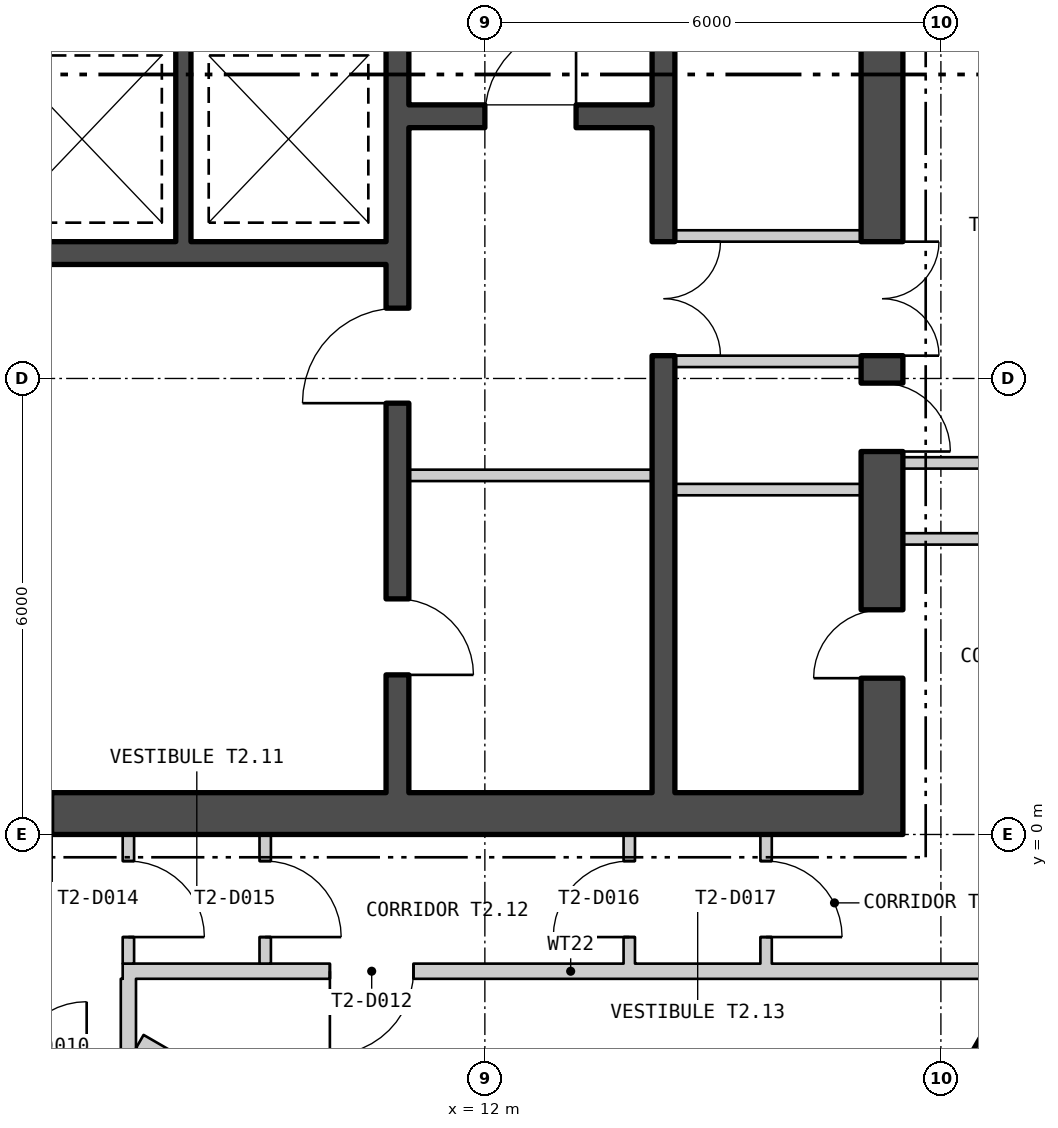
"""IFC4 building model, lengths in metres.
Left out: names, types, materials, properties, quantities, classifications, styles, units other than length and angle.
Written with IfcOpenShell. Run it as: python <this file> out.ifc"""

import sys

from ifc_helpers import new_model, si_unit, direction, frame, frame_2d, origin, place, context, subcontext, project, spatial, polyline, rectangle, outline, extrude, element, fill, save


model = new_model("IFC4")
c1 = context("Model", 3, precision=1e-05, world=origin(), true_north=direction((0.0, 1.0)))
c2 = subcontext(c1, "Body", "Model", "MODEL_VIEW")
j1 = project(units=[si_unit("LENGTHUNIT", "METRE"), si_unit("PLANEANGLEUNIT", "RADIAN")], contexts=[c1])
p1 = place(None, origin())
s1 = spatial("IfcSite", under=j1, at=p1, CompositionType="ELEMENT")
p2 = place(p1, origin())
s2 = spatial("IfcBuilding", under=s1, at=p2, CompositionType="ELEMENT")
p3 = place(p2, frame((0.0, 0.0, 133.8)))
s3 = spatial("IfcBuildingStorey", under=s2, at=p3, CompositionType="ELEMENT", Elevation=133.8)
p4 = place(p3, frame((4.49, -27.423, -0.18), z_axis=(0.0, 0.0, 1.0), x_axis=(0.500000335318, 0.866025210188, 0.0)))
e1 = element("IfcWall", 1, at=p4, inside=s3, PredefinedType="SOLIDWALL", context=c2, shape_type="SweptSolid", body=[
    extrude(outline(polyline([(-0.13, -0.225), (45.88, -0.225), (45.62, 0.225), (0.13, 0.225), (-0.13, -0.225)])), origin(), (0.0, 0.0, 1.0), 6.0),
])
p5 = place(p4, frame((1.425, 0.0, 1.38)))
e2 = element("IfcOpeningElement", 2, at=p5, cuts=e1, PredefinedType="OPENING", context=c2, shape_type="SweptSolid", body=[
    extrude(rectangle(XDim=2.4, YDim=3.6, at=frame_2d((1.2, 1.8))), frame((0.0, 0.235, 0.0), z_axis=(0.0, -1.0, 0.0), x_axis=(1.0, 0.0, 0.0)), (0.0, 0.0, 1.0), 0.47),
])
p6 = place(p4, frame((5.895, 0.0, 1.38)))
e3 = element("IfcOpeningElement", 3, at=p6, cuts=e1, PredefinedType="OPENING", context=c2, shape_type="SweptSolid", body=[
    extrude(rectangle(XDim=2.4, YDim=3.6, at=frame_2d((1.2, 1.8))), frame((0.0, 0.235, 0.0), z_axis=(0.0, -1.0, 0.0), x_axis=(1.0, 0.0, 0.0)), (0.0, 0.0, 1.0), 0.47),
])
p7 = place(p4, frame((10.403, 0.0, 1.38)))
e4 = element("IfcOpeningElement", 4, at=p7, cuts=e1, PredefinedType="OPENING", context=c2, shape_type="SweptSolid", body=[
    extrude(rectangle(XDim=2.4, YDim=3.6, at=frame_2d((1.2, 1.8))), frame((0.0, 0.235, 0.0), z_axis=(0.0, -1.0, 0.0), x_axis=(1.0, 0.0, 0.0)), (0.0, 0.0, 1.0), 0.47),
])
p8 = place(p4, frame((14.912, 0.0, 1.38)))
e5 = element("IfcOpeningElement", 5, at=p8, cuts=e1, PredefinedType="OPENING", context=c2, shape_type="SweptSolid", body=[
    extrude(rectangle(XDim=2.4, YDim=3.6, at=frame_2d((1.2, 1.8))), frame((0.0, 0.235, 0.0), z_axis=(0.0, -1.0, 0.0), x_axis=(1.0, 0.0, 0.0)), (0.0, 0.0, 1.0), 0.47),
])
p9 = place(p4, frame((19.421, 0.0, 1.38)))
e6 = element("IfcOpeningElement", 6, at=p9, cuts=e1, PredefinedType="OPENING", context=c2, shape_type="SweptSolid", body=[
    extrude(rectangle(XDim=2.4, YDim=3.6, at=frame_2d((1.2, 1.8))), frame((0.0, 0.235, 0.0), z_axis=(0.0, -1.0, 0.0), x_axis=(1.0, 0.0, 0.0)), (0.0, 0.0, 1.0), 0.47),
])
p10 = place(p4, frame((23.929, 0.0, 1.38)))
e7 = element("IfcOpeningElement", 7, at=p10, cuts=e1, PredefinedType="OPENING", context=c2, shape_type="SweptSolid", body=[
    extrude(rectangle(XDim=2.4, YDim=3.6, at=frame_2d((1.2, 1.8))), frame((0.0, 0.235, 0.0), z_axis=(0.0, -1.0, 0.0), x_axis=(1.0, 0.0, 0.0)), (0.0, 0.0, 1.0), 0.47),
])
p11 = place(p4, frame((28.438, 0.0, 1.38)))
e8 = element("IfcOpeningElement", 8, at=p11, cuts=e1, PredefinedType="OPENING", context=c2, shape_type="SweptSolid", body=[
    extrude(rectangle(XDim=2.4, YDim=3.6, at=frame_2d((1.2, 1.8))), frame((0.0, 0.235, 0.0), z_axis=(0.0, -1.0, 0.0), x_axis=(1.0, 0.0, 0.0)), (0.0, 0.0, 1.0), 0.47),
])
p12 = place(p4, frame((32.947, 0.0, 1.38)))
e9 = element("IfcOpeningElement", 9, at=p12, cuts=e1, PredefinedType="OPENING", context=c2, shape_type="SweptSolid", body=[
    extrude(rectangle(XDim=2.4, YDim=3.6, at=frame_2d((1.2, 1.8))), frame((0.0, 0.235, 0.0), z_axis=(0.0, -1.0, 0.0), x_axis=(1.0, 0.0, 0.0)), (0.0, 0.0, 1.0), 0.47),
])
p13 = place(p4, frame((37.455, 0.0, 1.38)))
e10 = element("IfcOpeningElement", 10, at=p13, cuts=e1, PredefinedType="OPENING", context=c2, shape_type="SweptSolid", body=[
    extrude(rectangle(XDim=2.4, YDim=3.6, at=frame_2d((1.2, 1.8))), frame((0.0, 0.235, 0.0), z_axis=(0.0, -1.0, 0.0), x_axis=(1.0, 0.0, 0.0)), (0.0, 0.0, 1.0), 0.47),
])
p14 = place(p4, frame((41.925, 0.0, 1.38)))
e11 = element("IfcOpeningElement", 11, at=p14, cuts=e1, PredefinedType="OPENING", context=c2, shape_type="SweptSolid", body=[
    extrude(rectangle(XDim=2.4, YDim=3.6, at=frame_2d((1.2, 1.8))), frame((0.0, 0.235, 0.0), z_axis=(0.0, -1.0, 0.0), x_axis=(1.0, 0.0, 0.0)), (0.0, 0.0, 1.0), 0.47),
])
p15 = place(p3, frame((-17.5, 0.275, 0.0), z_axis=(0.0, 0.0, 1.0), x_axis=(1.0, 0.0, 0.0)))
e12 = element("IfcWall", 12, at=p15, inside=s3, PredefinedType="SHEAR", context=c2, shape_type="SweptSolid", body=[
    extrude(rectangle(XDim=35.0, YDim=0.55, at=frame_2d((17.5, 0.0))), origin(), (0.0, 0.0, 1.0), 5.8),
])
p16 = place(p15, frame((12.0, 0.0, 0.0)))
e13 = element("IfcOpeningElement", 13, at=p16, cuts=e12, PredefinedType="OPENING", context=c2, shape_type="SweptSolid", body=[
    extrude(rectangle(XDim=1.8, YDim=2.4, at=frame_2d((0.9, 1.2))), frame((0.0, 0.285, 0.0), z_axis=(0.0, -1.0, 0.0), x_axis=(1.0, 0.0, 0.0)), (0.0, 0.0, 1.0), 0.57),
])
p17 = place(p15, frame((22.0, 0.0, 0.0)))
e14 = element("IfcOpeningElement", 14, at=p17, cuts=e12, PredefinedType="OPENING", context=c2, shape_type="SweptSolid", body=[
    extrude(rectangle(XDim=1.8, YDim=2.4, at=frame_2d((0.9, 1.2))), frame((0.0, 0.285, 0.0), z_axis=(0.0, -1.0, 0.0), x_axis=(1.0, 0.0, 0.0)), (0.0, 0.0, 1.0), 0.57),
])
p18 = place(p3, frame((17.225, 0.55, 0.0), z_axis=(0.0, 0.0, 1.0), x_axis=(0.0, 1.0, 0.0)))
e15 = element("IfcWall", 15, at=p18, inside=s3, PredefinedType="SHEAR", context=c2, shape_type="SweptSolid", body=[
    extrude(rectangle(XDim=16.9, YDim=0.55, at=frame_2d((8.45, 0.0))), origin(), (0.0, 0.0, 1.0), 5.8),
])
p19 = place(p18, frame((5.75, 0.0, 0.0)))
e16 = element("IfcOpeningElement", 16, at=p19, cuts=e15, PredefinedType="OPENING", context=c2, shape_type="SweptSolid", body=[
    extrude(rectangle(XDim=1.5, YDim=2.1, at=frame_2d((0.75, 1.05))), frame((0.0, 0.285, 0.0), z_axis=(0.0, -1.0, 0.0), x_axis=(1.0, 0.0, 0.0)), (0.0, 0.0, 1.0), 0.57),
])
p20 = place(p18, frame((1.506, 0.0, 0.0)))
e17 = element("IfcOpeningElement", 17, at=p20, cuts=e15, PredefinedType="OPENING", context=c2, shape_type="SweptSolid", body=[
    extrude(rectangle(XDim=0.9, YDim=2.1, at=frame_2d((0.45, 1.05))), frame((0.0, 0.285, 0.0), z_axis=(0.0, -1.0, 0.0), x_axis=(1.0, 0.0, 0.0)), (0.0, 0.0, 1.0), 0.57),
])
p21 = place(p18, frame((4.489, 0.0, 0.0)))
e18 = element("IfcOpeningElement", 18, at=p21, cuts=e15, PredefinedType="OPENING", context=c2, shape_type="SweptSolid", body=[
    extrude(rectangle(XDim=0.9, YDim=2.1, at=frame_2d((0.45, 1.05))), frame((0.0, 0.285, 0.0), z_axis=(0.0, -1.0, 0.0), x_axis=(1.0, 0.0, 0.0)), (0.0, 0.0, 1.0), 0.57),
])
p22 = place(p18, frame((10.553, 0.0, 0.0)))
e19 = element("IfcOpeningElement", 19, at=p22, cuts=e15, PredefinedType="OPENING", context=c2, shape_type="SweptSolid", body=[
    extrude(rectangle(XDim=0.9, YDim=2.1, at=frame_2d((0.45, 1.05))), frame((0.0, 0.285, 0.0), z_axis=(0.0, -1.0, 0.0), x_axis=(1.0, 0.0, 0.0)), (0.0, 0.0, 1.0), 0.57),
])
p23 = place(p18, frame((15.328, 0.0, 0.0)))
e20 = element("IfcOpeningElement", 20, at=p23, cuts=e15, PredefinedType="OPENING", context=c2, shape_type="SweptSolid", body=[
    extrude(rectangle(XDim=1.0, YDim=2.1, at=frame_2d((0.5, 1.05))), frame((0.0, 0.285, 0.0), z_axis=(0.0, -1.0, 0.0), x_axis=(1.0, 0.0, 0.0)), (0.0, 0.0, 1.0), 0.57),
])
p24 = place(p3, frame((10.85, 0.55, 0.0), z_axis=(0.0, 0.0, 1.0), x_axis=(0.0, 1.0, 0.0)))
e21 = element("IfcWall", 21, at=p24, inside=s3, PredefinedType="SHEAR", context=c2, shape_type="SweptSolid", body=[
    extrude(rectangle(XDim=16.9, YDim=0.3, at=frame_2d((8.45, 0.0))), origin(), (0.0, 0.0, 1.0), 5.8),
])
p25 = place(p24, frame((5.125, 0.0, 0.0)))
e22 = element("IfcOpeningElement", 22, at=p25, cuts=e21, PredefinedType="OPENING", context=c2, shape_type="SweptSolid", body=[
    extrude(rectangle(XDim=1.25, YDim=2.1, at=frame_2d((0.625, 1.05))), frame((0.0, 0.16, 0.0), z_axis=(0.0, -1.0, 0.0), x_axis=(1.0, 0.0, 0.0)), (0.0, 0.0, 1.0), 0.32),
])
p26 = place(p24, frame((1.55, 0.0, 0.0)))
e23 = element("IfcOpeningElement", 23, at=p26, cuts=e21, PredefinedType="OPENING", context=c2, shape_type="SweptSolid", body=[
    extrude(rectangle(XDim=1.0, YDim=2.1, at=frame_2d((0.5, 1.05))), frame((0.0, 0.16, 0.0), z_axis=(0.0, -1.0, 0.0), x_axis=(1.0, 0.0, 0.0)), (0.0, 0.0, 1.0), 0.32),
])
p27 = place(p3, frame((14.35, 0.55, 0.0), z_axis=(0.0, 0.0, 1.0), x_axis=(0.0, 1.0, 0.0)))
e24 = element("IfcWall", 24, at=p27, inside=s3, PredefinedType="SHEAR", context=c2, shape_type="SweptSolid", body=[
    extrude(rectangle(XDim=16.9, YDim=0.3, at=frame_2d((8.45, 0.0))), origin(), (0.0, 0.0, 1.0), 5.8),
])
p28 = place(p27, frame((5.75, 0.0, 0.0)))
e25 = element("IfcOpeningElement", 25, at=p28, cuts=e24, PredefinedType="OPENING", context=c2, shape_type="SweptSolid", body=[
    extrude(rectangle(XDim=1.5, YDim=2.1, at=frame_2d((0.75, 1.05))), frame((0.0, 0.16, 0.0), z_axis=(0.0, -1.0, 0.0), x_axis=(1.0, 0.0, 0.0)), (0.0, 0.0, 1.0), 0.32),
])
p29 = place(p3, frame((11.0, 9.45, 0.0), z_axis=(0.0, 0.0, 1.0), x_axis=(1.0, 0.0, 0.0)))
e26 = element("IfcWall", 26, at=p29, inside=s3, PredefinedType="SHEAR", context=c2, shape_type="SweptSolid", body=[
    extrude(rectangle(XDim=3.2, YDim=0.3, at=frame_2d((1.6, 0.0))), origin(), (0.0, 0.0, 1.0), 5.8),
])
p30 = place(p29, frame((1.0, 0.0, 0.0)))
e27 = element("IfcOpeningElement", 27, at=p30, cuts=e26, PredefinedType="OPENING", context=c2, shape_type="SweptSolid", body=[
    extrude(rectangle(XDim=1.2, YDim=2.1, at=frame_2d((0.6, 1.05))), frame((0.0, 0.16, 0.0), z_axis=(0.0, -1.0, 0.0), x_axis=(1.0, 0.0, 0.0)), (0.0, 0.0, 1.0), 0.32),
])
p31 = place(p3, frame((2.6, 7.65, 0.0), z_axis=(0.0, 0.0, 1.0), x_axis=(1.0, 0.0, 0.0)))
e28 = element("IfcWall", 28, at=p31, inside=s3, PredefinedType="SHEAR", context=c2, shape_type="SweptSolid", body=[
    extrude(rectangle(XDim=8.1, YDim=0.3, at=frame_2d((4.05, 0.0))), origin(), (0.0, 0.0, 1.0), 5.8),
])
p32 = place(p3, frame((8.033, 7.8, 0.0), z_axis=(0.0, 0.0, 1.0), x_axis=(0.0, 1.0, 0.0)))
e29 = element("IfcWall", 29, at=p32, inside=s3, PredefinedType="SHEAR", context=c2, shape_type="SweptSolid", body=[
    extrude(rectangle(XDim=2.7, YDim=0.2, at=frame_2d((1.35, 0.0))), origin(), (0.0, 0.0, 1.0), 5.8),
])
p33 = place(p3, frame((11.0, 4.725, 0.0), z_axis=(0.0, 0.0, 1.0), x_axis=(1.0, 0.0, 0.0)))
e30 = element("IfcWall", 30, at=p33, inside=s3, PredefinedType="PARTITIONING", context=c2, shape_type="SweptSolid", body=[
    extrude(rectangle(XDim=3.2, YDim=0.15, at=frame_2d((1.6, 0.0))), origin(), (0.0, 0.0, 1.0), 5.8),
])
p34 = place(p3, frame((14.5, 6.225, 0.0), z_axis=(0.0, 0.0, 1.0), x_axis=(1.0, 0.0, 0.0)))
e31 = element("IfcWall", 31, at=p34, inside=s3, PredefinedType="PARTITIONING", context=c2, shape_type="SweptSolid", body=[
    extrude(rectangle(XDim=2.45, YDim=0.15, at=frame_2d((1.225, 0.0))), origin(), (0.0, 0.0, 1.0), 5.8),
])
p35 = place(p3, frame((14.5, 7.875, 0.0), z_axis=(0.0, 0.0, 1.0), x_axis=(1.0, 0.0, 0.0)))
e32 = element("IfcWall", 32, at=p35, inside=s3, PredefinedType="PARTITIONING", context=c2, shape_type="SweptSolid", body=[
    extrude(rectangle(XDim=2.45, YDim=0.15, at=frame_2d((1.225, 0.0))), origin(), (0.0, 0.0, 1.0), 5.5),
])
p36 = place(p3, frame((14.5, 4.538, 0.0), z_axis=(0.0, 0.0, 1.0), x_axis=(1.0, 0.0, 0.0)))
e33 = element("IfcWall", 33, at=p36, inside=s3, PredefinedType="PARTITIONING", context=c2, shape_type="SweptSolid", body=[
    extrude(rectangle(XDim=2.45, YDim=0.15, at=frame_2d((1.225, 0.0))), origin(), (0.0, 0.0, 1.0), 5.8),
])
p37 = place(p3, frame((7.235, -1.799, 0.0), z_axis=(0.0, 0.0, 1.0), x_axis=(0.999999996402, -8.4832032e-05, 0.0)))
e34 = element("IfcWall", 34, at=p37, inside=s3, PredefinedType="PARTITIONING", context=c2, shape_type="SweptSolid", body=[
    extrude(rectangle(XDim=11.788, YDim=0.2, at=frame_2d((5.894, 0.0))), origin(), (0.0, 0.0, 1.0), 5.8),
])
p38 = place(p37, frame((2.726, 0.0, 0.0)))
e35 = element("IfcOpeningElement", 35, at=p38, cuts=e34, PredefinedType="OPENING", context=c2, shape_type="SweptSolid", body=[
    extrude(rectangle(XDim=1.1, YDim=2.1, at=frame_2d((0.55, 1.05))), frame((0.0, 0.11, 0.0), z_axis=(0.0, -1.0, 0.0), x_axis=(1.0, 0.0, 0.0)), (0.0, 0.0, 1.0), 0.22),
])
p39 = place(p3, frame((7.31, -3.2, 0.0), z_axis=(0.0, 0.0, 1.0), x_axis=(0.0, 1.0, 0.0)))
e36 = element("IfcWall", 36, at=p39, inside=s3, PredefinedType="PARTITIONING", context=c2, shape_type="SweptSolid", body=[
    extrude(rectangle(XDim=1.301, YDim=0.2, at=frame_2d((0.65, 0.0))), origin(), (0.0, 0.0, 1.0), 5.8),
])
p40 = place(p3, frame((7.31, -1.699, 0.0), z_axis=(0.0, 0.0, 1.0), x_axis=(0.0, 1.0, 0.0)))
e37 = element("IfcWall", 37, at=p40, inside=s3, PredefinedType="PARTITIONING", context=c2, shape_type="SweptSolid", body=[
    extrude(rectangle(XDim=1.698, YDim=0.15, at=frame_2d((0.849, 0.0))), origin(), (0.0, 0.0, 1.0), 5.8),
])
p41 = place(p40, frame((0.349, 0.0, 0.0)))
e38 = element("IfcOpeningElement", 38, at=p41, cuts=e37, PredefinedType="OPENING", context=c2, shape_type="SweptSolid", body=[
    extrude(rectangle(XDim=1.0, YDim=2.1, at=frame_2d((0.5, 1.05))), frame((0.0, 0.085, 0.0), z_axis=(0.0, -1.0, 0.0), x_axis=(1.0, 0.0, 0.0)), (0.0, 0.0, 1.0), 0.17),
])
p42 = place(p3, frame((7.46, -2.724, 0.0), z_axis=(0.0, 0.0, 1.0), x_axis=(0.866112420066, -0.499849253082, 0.0)))
e39 = element("IfcWall", 39, at=p42, inside=s3, PredefinedType="PARTITIONING", context=c2, shape_type="SweptSolid", body=[
    extrude(rectangle(XDim=9.103, YDim=0.2, at=frame_2d((4.551, 0.0))), origin(), (0.0, 0.0, 1.0), 5.8),
])
p43 = place(p3, frame((9.11, -1.699, 0.0), z_axis=(0.0, 0.0, 1.0), x_axis=(0.0, 1.0, 0.0)))
e40 = element("IfcWall", 40, at=p43, inside=s3, PredefinedType="PARTITIONING", context=c2, shape_type="SweptSolid", body=[
    extrude(rectangle(XDim=1.698, YDim=0.15, at=frame_2d((0.849, 0.0))), origin(), (0.0, 0.0, 1.0), 5.8),
])
p44 = place(p43, frame((0.349, 0.0, 0.0)))
e41 = element("IfcOpeningElement", 41, at=p44, cuts=e40, PredefinedType="OPENING", context=c2, shape_type="SweptSolid", body=[
    extrude(rectangle(XDim=1.0, YDim=2.1, at=frame_2d((0.5, 1.05))), frame((0.0, 0.085, 0.0), z_axis=(0.0, -1.0, 0.0), x_axis=(1.0, 0.0, 0.0)), (0.0, 0.0, 1.0), 0.17),
])
p45 = place(p3, frame((13.9, -1.7, 0.0), z_axis=(0.0, 0.0, 1.0), x_axis=(0.0, 1.0, 0.0)))
e42 = element("IfcWall", 42, at=p45, inside=s3, PredefinedType="PARTITIONING", context=c2, shape_type="SweptSolid", body=[
    extrude(rectangle(XDim=1.7, YDim=0.15, at=frame_2d((0.85, 0.0))), origin(), (0.0, 0.0, 1.0), 5.8),
])
p46 = place(p45, frame((0.35, 0.0, 0.0)))
e43 = element("IfcOpeningElement", 43, at=p46, cuts=e42, PredefinedType="OPENING", context=c2, shape_type="SweptSolid", body=[
    extrude(rectangle(XDim=1.0, YDim=2.1, at=frame_2d((0.5, 1.05))), frame((0.0, 0.085, 0.0), z_axis=(0.0, -1.0, 0.0), x_axis=(1.0, 0.0, 0.0)), (0.0, 0.0, 1.0), 0.17),
])
p47 = place(p3, frame((15.7, -1.7, 0.0), z_axis=(0.0, 0.0, 1.0), x_axis=(0.0, 1.0, 0.0)))
e44 = element("IfcWall", 44, at=p47, inside=s3, PredefinedType="PARTITIONING", context=c2, shape_type="SweptSolid", body=[
    extrude(rectangle(XDim=1.7, YDim=0.15, at=frame_2d((0.85, 0.0))), origin(), (0.0, 0.0, 1.0), 5.8),
])
p48 = place(p47, frame((0.35, 0.0, 0.0)))
e45 = element("IfcOpeningElement", 45, at=p48, cuts=e44, PredefinedType="OPENING", context=c2, shape_type="SweptSolid", body=[
    extrude(rectangle(XDim=1.0, YDim=2.1, at=frame_2d((0.5, 1.05))), frame((0.0, 0.085, 0.0), z_axis=(0.0, -1.0, 0.0), x_axis=(1.0, 0.0, 0.0)), (0.0, 0.0, 1.0), 0.17),
])
p49 = place(p3, frame((17.5, 3.889, 0.0), z_axis=(0.0, 0.0, 1.0), x_axis=(1.0, 0.0, 0.0)))
e46 = element("IfcWall", 46, at=p49, inside=s3, PredefinedType="PARTITIONING", context=c2, shape_type="SweptSolid", body=[
    extrude(rectangle(XDim=4.0, YDim=0.15, at=frame_2d((2.0, 0.0))), origin(), (0.0, 0.0, 1.0), 5.8),
])
p50 = place(p3, frame((17.5, 4.889, 0.0), z_axis=(0.0, 0.0, 1.0), x_axis=(1.0, 0.0, 0.0)))
e47 = element("IfcWall", 47, at=p50, inside=s3, PredefinedType="PARTITIONING", context=c2, shape_type="SweptSolid", body=[
    extrude(rectangle(XDim=1.7, YDim=0.15, at=frame_2d((0.85, 0.0))), origin(), (0.0, 0.0, 1.0), 5.8),
])
p51 = place(p30, origin())
e48 = element("IfcDoor", 48, at=p51, inside=s3, OperationType="SINGLE_SWING_LEFT", PredefinedType="DOOR", context=c2, shape_type="SweptSolid", body=[
    extrude(rectangle(XDim=1.2, YDim=2.1, at=frame_2d((0.6, 1.05))), frame((0.0, 0.025, 0.0), z_axis=(0.0, -1.0, 0.0), x_axis=(1.0, 0.0, 0.0)), (0.0, 0.0, 1.0), 0.05),
])
fill(e27, e48)
p52 = place(p25, origin())
e49 = element("IfcDoor", 49, at=p52, inside=s3, OperationType="SINGLE_SWING_RIGHT", PredefinedType="DOOR", context=c2, shape_type="SweptSolid", body=[
    extrude(rectangle(XDim=1.25, YDim=2.1, at=frame_2d((0.625, 1.05))), frame((0.0, 0.025, 0.0), z_axis=(0.0, -1.0, 0.0), x_axis=(1.0, 0.0, 0.0)), (0.0, 0.0, 1.0), 0.05),
])
fill(e22, e49)
p53 = place(p26, origin())
e50 = element("IfcDoor", 50, at=p53, inside=s3, OperationType="SINGLE_SWING_LEFT", PredefinedType="DOOR", context=c2, shape_type="SweptSolid", body=[
    extrude(rectangle(XDim=1.0, YDim=2.1, at=frame_2d((0.5, 1.05))), frame((0.0, 0.025, 0.0), z_axis=(0.0, -1.0, 0.0), x_axis=(1.0, 0.0, 0.0)), (0.0, 0.0, 1.0), 0.05),
])
fill(e23, e50)
p54 = place(p28, origin())
e51 = element("IfcDoor", 51, at=p54, inside=s3, OperationType="DOUBLE_DOOR_SINGLE_SWING", PredefinedType="DOOR", context=c2, shape_type="SweptSolid", body=[
    extrude(rectangle(XDim=1.5, YDim=2.1, at=frame_2d((0.75, 1.05))), frame((0.0, 0.025, 0.0), z_axis=(0.0, -1.0, 0.0), x_axis=(1.0, 0.0, 0.0)), (0.0, 0.0, 1.0), 0.05),
])
fill(e25, e51)
p55 = place(p19, origin())
e52 = element("IfcDoor", 52, at=p55, inside=s3, OperationType="DOUBLE_DOOR_SINGLE_SWING", PredefinedType="DOOR", context=c2, shape_type="SweptSolid", body=[
    extrude(rectangle(XDim=1.5, YDim=2.1, at=frame_2d((0.75, 1.05))), frame((0.0, 0.025, 0.0), z_axis=(0.0, -1.0, 0.0), x_axis=(1.0, 0.0, 0.0)), (0.0, 0.0, 1.0), 0.05),
])
fill(e16, e52)
p56 = place(p20, origin())
e53 = element("IfcDoor", 53, at=p56, inside=s3, OperationType="SINGLE_SWING_RIGHT", PredefinedType="DOOR", context=c2, shape_type="SweptSolid", body=[
    extrude(rectangle(XDim=0.9, YDim=2.1, at=frame_2d((0.45, 1.05))), frame((0.0, 0.025, 0.0), z_axis=(0.0, -1.0, 0.0), x_axis=(1.0, 0.0, 0.0)), (0.0, 0.0, 1.0), 0.05),
])
fill(e17, e53)
p57 = place(p21, origin())
e54 = element("IfcDoor", 54, at=p57, inside=s3, OperationType="SINGLE_SWING_LEFT", PredefinedType="DOOR", context=c2, shape_type="SweptSolid", body=[
    extrude(rectangle(XDim=0.9, YDim=2.1, at=frame_2d((0.45, 1.05))), frame((0.0, 0.025, 0.0), z_axis=(0.0, -1.0, 0.0), x_axis=(1.0, 0.0, 0.0)), (0.0, 0.0, 1.0), 0.05),
])
fill(e18, e54)
p58 = place(p38, origin())
e55 = element("IfcDoor", 55, at=p58, inside=s3, OperationType="SINGLE_SWING_LEFT", PredefinedType="DOOR", context=c2, shape_type="SweptSolid", body=[
    extrude(rectangle(XDim=1.1, YDim=2.1, at=frame_2d((0.55, 1.05))), frame((0.0, 0.025, 0.0), z_axis=(0.0, -1.0, 0.0), x_axis=(1.0, 0.0, 0.0)), (0.0, 0.0, 1.0), 0.05),
])
fill(e35, e55)
p59 = place(p41, origin())
e56 = element("IfcDoor", 56, at=p59, inside=s3, OperationType="SINGLE_SWING_LEFT", PredefinedType="DOOR", context=c2, shape_type="SweptSolid", body=[
    extrude(rectangle(XDim=1.0, YDim=2.1, at=frame_2d((0.5, 1.05))), frame((0.0, 0.025, 0.0), z_axis=(0.0, -1.0, 0.0), x_axis=(1.0, 0.0, 0.0)), (0.0, 0.0, 1.0), 0.05),
])
fill(e38, e56)
p60 = place(p44, origin())
e57 = element("IfcDoor", 57, at=p60, inside=s3, OperationType="SINGLE_SWING_LEFT", PredefinedType="DOOR", context=c2, shape_type="SweptSolid", body=[
    extrude(rectangle(XDim=1.0, YDim=2.1, at=frame_2d((0.5, 1.05))), frame((0.0, 0.025, 0.0), z_axis=(0.0, -1.0, 0.0), x_axis=(1.0, 0.0, 0.0)), (0.0, 0.0, 1.0), 0.05),
])
fill(e41, e57)
p61 = place(p46, origin())
e58 = element("IfcDoor", 58, at=p61, inside=s3, OperationType="SINGLE_SWING_RIGHT", PredefinedType="DOOR", context=c2, shape_type="SweptSolid", body=[
    extrude(rectangle(XDim=1.0, YDim=2.1, at=frame_2d((0.5, 1.05))), frame((0.0, 0.025, 0.0), z_axis=(0.0, -1.0, 0.0), x_axis=(1.0, 0.0, 0.0)), (0.0, 0.0, 1.0), 0.05),
])
fill(e43, e58)
p62 = place(p48, origin())
e59 = element("IfcDoor", 59, at=p62, inside=s3, OperationType="SINGLE_SWING_LEFT", PredefinedType="DOOR", context=c2, shape_type="SweptSolid", body=[
    extrude(rectangle(XDim=1.0, YDim=2.1, at=frame_2d((0.5, 1.05))), frame((0.0, 0.025, 0.0), z_axis=(0.0, -1.0, 0.0), x_axis=(1.0, 0.0, 0.0)), (0.0, 0.0, 1.0), 0.05),
])
fill(e45, e59)
save(model, sys.argv[1])
